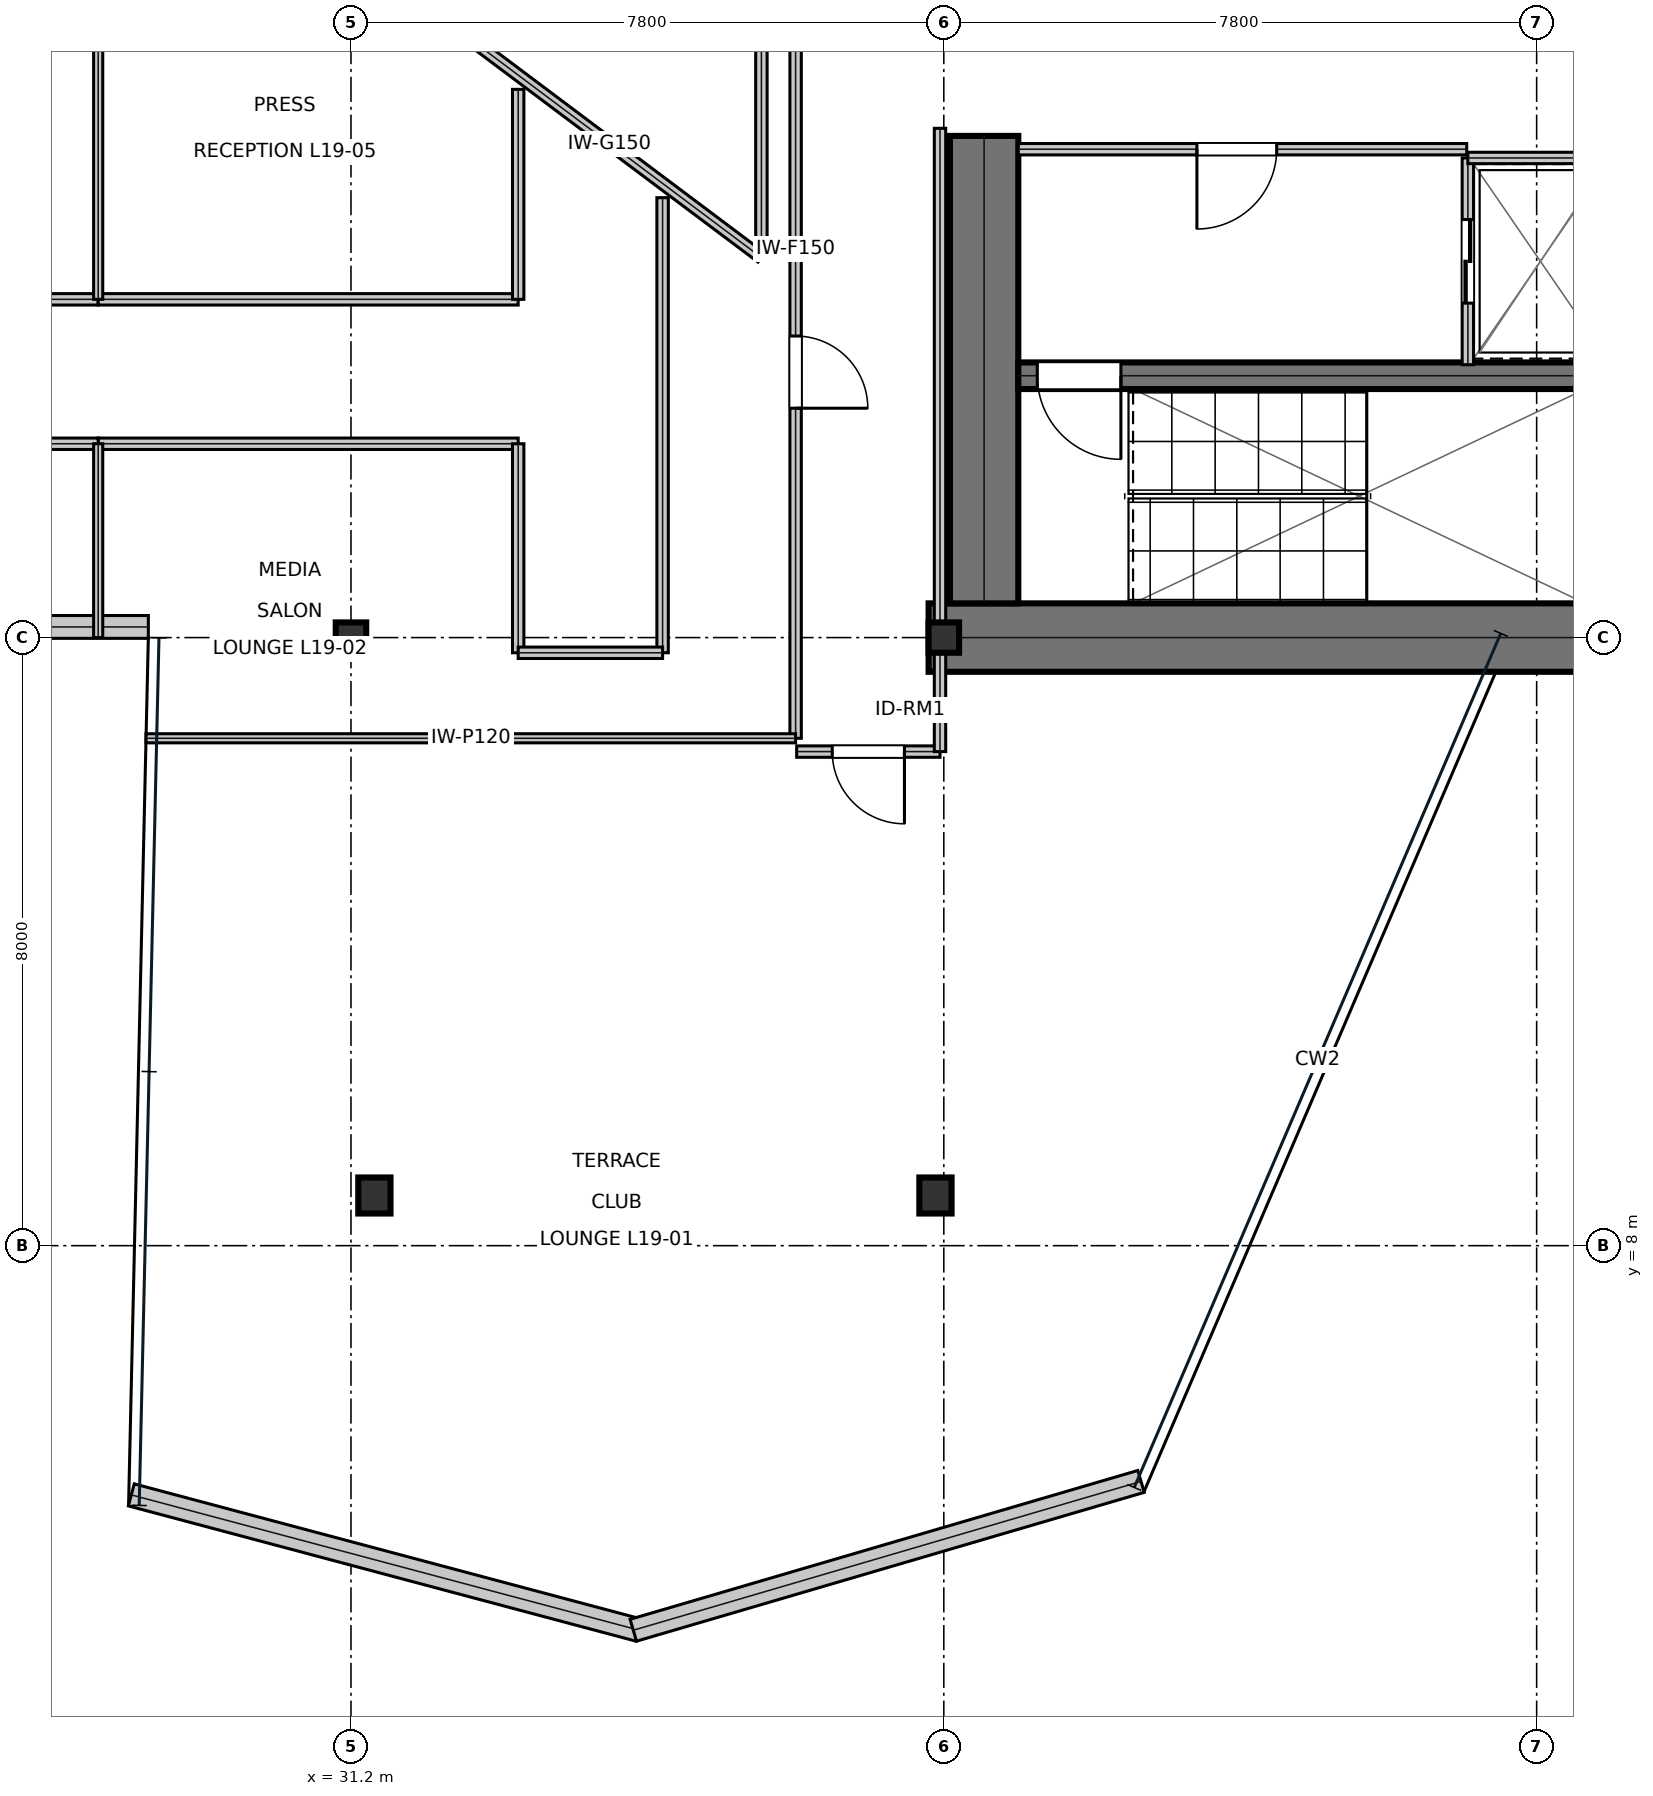
"""IFC4 building model, lengths in metres.
Left out: names, types, materials, properties, quantities, classifications, styles, units other than length and angle.
Written with IfcOpenShell. Run it as: python <this file> out.ifc"""

import sys

from ifc_helpers import new_model, si_unit, direction, frame, frame_2d, origin, origin_2d, place, context, subcontext, project, spatial, rectangle, i_section, extrude, element, fill, save


model = new_model("IFC4")
c1 = context("Model", 3, precision=1e-05, world=origin(), true_north=direction((0.0, 1.0)))
c2 = subcontext(c1, "Body", "Model", "MODEL_VIEW")
j1 = project(units=[si_unit("LENGTHUNIT", "METRE"), si_unit("PLANEANGLEUNIT", "RADIAN")], contexts=[c1])
p1 = place(None, origin())
s1 = spatial("IfcSite", under=j1, at=p1, CompositionType="ELEMENT")
p2 = place(p1, origin())
s2 = spatial("IfcBuilding", under=s1, at=p2, CompositionType="ELEMENT")
p3 = place(p2, frame((0.0, 0.0, 86.4)))
s3 = spatial("IfcBuildingStorey", under=s2, at=p3, CompositionType="ELEMENT", Elevation=86.4)
p4 = place(p3, frame((38.8, 16.0, 0.0), z_axis=(0.0, 0.0, 1.0), x_axis=(1.0, 0.0, 0.0)))
e1 = element("IfcWall", 1, at=p4, inside=s3, PredefinedType="SHEAR", context=c2, shape_type="SweptSolid", body=[
    extrude(rectangle(XDim=16.0, YDim=0.9, at=frame_2d((8.0, 0.0))), origin(), (0.0, 0.0, 1.0), 3.81),
])
p5 = place(p3, frame((39.53, 16.45, 0.0), z_axis=(0.0, 0.0, 1.0), x_axis=(0.0, 1.0, 0.0)))
e2 = element("IfcWall", 2, at=p5, inside=s3, PredefinedType="SHEAR", context=c2, shape_type="SweptSolid", body=[
    extrude(rectangle(XDim=6.15, YDim=0.9, at=frame_2d((3.075, 0.0))), origin(), (0.0, 0.0, 1.0), 3.81),
])
p6 = place(p3, frame((39.98, 19.445, 0.0), z_axis=(0.0, 0.0, 1.0), x_axis=(1.0, 0.0, 0.0)))
e3 = element("IfcWall", 3, at=p6, inside=s3, PredefinedType="SHEAR", context=c2, shape_type="SweptSolid", body=[
    extrude(rectangle(XDim=7.71, YDim=0.35, at=frame_2d((3.855, 0.0))), origin(), (0.0, 0.0, 1.0), 3.81),
])
p7 = place(p6, frame((0.25, 0.0, 0.0)))
e4 = element("IfcOpeningElement", 4, at=p7, cuts=e3, PredefinedType="OPENING", context=c2, shape_type="SweptSolid", body=[
    extrude(rectangle(XDim=1.1, YDim=2.15, at=frame_2d((0.55, 1.075))), frame((0.0, 0.185, 0.0), z_axis=(0.0, -1.0, 0.0), x_axis=(1.0, 0.0, 0.0)), (0.0, 0.0, 1.0), 0.37),
])
for number, where, z_axis, x_axis in (
    (5, (31.2, 16.0, 0.0), (0.0, 0.0, 1.0), (1.0, 0.0, 0.0)),
    (6, (39.0, 16.0, 0.0), (0.0, 0.0, 1.0), (1.0, 0.0, 0.0)),
):
    element("IfcColumn", number, at=place(p3, frame(where, z_axis=z_axis, x_axis=x_axis)), inside=s3, PredefinedType="COLUMN", context=c2, shape_type="SweptSolid", body=[
        extrude(i_section(OverallWidth=0.401, OverallDepth=0.399, WebThickness=0.025, FlangeThickness=0.04, at=origin_2d()), origin(), (0.0, 0.0, 1.0), 4.044),
    ])
p8 = place(p3, frame((31.508, 8.66, 0.016), z_axis=(0.003463243796, 0.00747331556, 0.999966077173), x_axis=(-0.907310606534, 0.420461012784, 0.0)))
e7 = element("IfcColumn", 7, at=p8, inside=s3, PredefinedType="COLUMN", context=c2, shape_type="SweptSolid", body=[
    extrude(i_section(OverallWidth=0.424, OverallDepth=0.474, WebThickness=0.048, FlangeThickness=0.077, at=origin_2d()), origin(), (0.0, 0.0, 1.0), 4.018),
])
p9 = place(p3, frame((38.89, 8.66, 0.016), z_axis=(-0.001215179652, 0.007473354861, 0.999971335742), x_axis=(-0.987036848987, -0.160493796583, 0.0)))
e8 = element("IfcColumn", 8, at=p9, inside=s3, PredefinedType="COLUMN", context=c2, shape_type="SweptSolid", body=[
    extrude(i_section(OverallWidth=0.424, OverallDepth=0.474, WebThickness=0.048, FlangeThickness=0.077, at=origin_2d()), origin(), (0.0, 0.0, 1.0), 4.018),
])
p10 = place(p3, frame((25.752, 16.14, 0.0), z_axis=(0.0, 0.0, 1.0), x_axis=(1.0, 0.0, 0.0)))
e9 = element("IfcWall", 9, at=p10, inside=s3, PredefinedType="STANDARD", context=c2, shape_type="SweptSolid", body=[
    extrude(rectangle(XDim=2.782, YDim=0.3, at=frame_2d((1.391, 0.0))), origin(), (0.0, 0.0, 1.0), 3.81),
])
p11 = place(p3, frame((28.31, 4.721, 0.0), z_axis=(0.0, 0.0, 1.0), x_axis=(0.966292357614, -0.257447236569, 0.0)))
e10 = element("IfcWall", 10, at=p11, inside=s3, PredefinedType="STANDARD", context=c2, shape_type="SweptSolid", body=[
    extrude(rectangle(XDim=6.913, YDim=0.3, at=frame_2d((3.457, 0.0))), origin(), (0.0, 0.0, 1.0), 3.81),
])
p12 = place(p3, frame((34.915, 2.94, 0.0), z_axis=(0.0, 0.0, 1.0), x_axis=(0.959627564603, 0.281273776336, 0.0)))
e11 = element("IfcWall", 11, at=p12, inside=s3, PredefinedType="STANDARD", context=c2, shape_type="SweptSolid", body=[
    extrude(rectangle(XDim=6.961, YDim=0.3, at=frame_2d((3.48, 0.0))), origin(), (0.0, 0.0, 1.0), 3.81),
])
p13 = place(p3, frame((39.98, 22.425, 0.0), z_axis=(0.0, 0.0, 1.0), x_axis=(1.0, 0.0, 0.0)))
e12 = element("IfcWall", 12, at=p13, inside=s3, PredefinedType="PARTITIONING", context=c2, shape_type="SweptSolid", body=[
    extrude(rectangle(XDim=5.9, YDim=0.15, at=frame_2d((2.95, 0.0))), origin(), (0.0, 0.0, 1.0), 3.81),
])
p14 = place(p13, frame((2.35, 0.0, 0.0)))
e13 = element("IfcOpeningElement", 13, at=p14, cuts=e12, PredefinedType="OPENING", context=c2, shape_type="SweptSolid", body=[
    extrude(rectangle(XDim=1.05, YDim=2.15, at=frame_2d((0.525, 1.075))), frame((0.0, 0.085, 0.0), z_axis=(0.0, -1.0, 0.0), x_axis=(1.0, 0.0, 0.0)), (0.0, 0.0, 1.0), 0.17),
])
p15 = place(p3, frame((45.895, 19.59, 0.0), z_axis=(0.0, 0.0, 1.0), x_axis=(0.0, 1.0, 0.0)))
e14 = element("IfcWall", 14, at=p15, inside=s3, PredefinedType="PARTITIONING", context=c2, shape_type="SweptSolid", body=[
    extrude(rectangle(XDim=2.72, YDim=0.15, at=frame_2d((1.36, 0.0))), origin(), (0.0, 0.0, 1.0), 3.81),
])
p16 = place(p15, frame((0.81, 0.0, 0.0)))
e15 = element("IfcOpeningElement", 15, at=p16, cuts=e14, PredefinedType="OPENING", context=c2, shape_type="SweptSolid", body=[
    extrude(rectangle(XDim=1.1, YDim=2.15, at=frame_2d((0.55, 1.075))), frame((0.0, 0.085, 0.0), z_axis=(0.0, -1.0, 0.0), x_axis=(1.0, 0.0, 0.0)), (0.0, 0.0, 1.0), 0.17),
])
p17 = place(p3, frame((45.895, 22.31, 0.0), z_axis=(0.0, 0.0, 1.0), x_axis=(1.0, 0.0, 0.0)))
e16 = element("IfcWall", 16, at=p17, inside=s3, PredefinedType="PARTITIONING", context=c2, shape_type="SweptSolid", body=[
    extrude(rectangle(XDim=1.915, YDim=0.15, at=frame_2d((0.958, 0.0))), origin(), (0.0, 0.0, 1.0), 3.81),
])
p18 = place(p3, frame((37.064, 14.5, 0.0), z_axis=(0.0, 0.0, 1.0), x_axis=(1.0, 0.0, 0.0)))
e17 = element("IfcWall", 17, at=p18, inside=s3, PredefinedType="PARTITIONING", context=c2, shape_type="SweptSolid", body=[
    extrude(rectangle(XDim=1.886, YDim=0.15, at=frame_2d((0.943, 0.0))), origin(), (0.0, 0.0, 1.0), 3.181),
])
p19 = place(p18, frame((0.468, 0.0, 0.0)))
e18 = element("IfcOpeningElement", 18, at=p19, cuts=e17, PredefinedType="OPENING", context=c2, shape_type="SweptSolid", body=[
    extrude(rectangle(XDim=0.95, YDim=2.15, at=frame_2d((0.475, 1.075))), frame((0.0, 0.085, 0.0), z_axis=(0.0, -1.0, 0.0), x_axis=(1.0, 0.0, 0.0)), (0.0, 0.0, 1.0), 0.17),
])
p20 = place(p3, frame((37.05, 14.675, 0.0), z_axis=(0.0, 0.0, 1.0), x_axis=(0.0, 1.0, 0.0)))
e19 = element("IfcWall", 19, at=p20, inside=s3, PredefinedType="PARTITIONING", context=c2, shape_type="SweptSolid", body=[
    extrude(rectangle(XDim=12.875, YDim=0.15, at=frame_2d((6.438, 0.0))), origin(), (0.0, 0.0, 1.0), 3.181),
])
p21 = place(p20, frame((4.343, 0.0, 0.0)))
e20 = element("IfcOpeningElement", 20, at=p21, cuts=e19, PredefinedType="OPENING", context=c2, shape_type="SweptSolid", body=[
    extrude(rectangle(XDim=0.95, YDim=2.15, at=frame_2d((0.475, 1.075))), frame((0.0, 0.085, 0.0), z_axis=(0.0, -1.0, 0.0), x_axis=(1.0, 0.0, 0.0)), (0.0, 0.0, 1.0), 0.17),
])
p22 = place(p3, frame((38.95, 14.5, 0.0), z_axis=(0.0, 0.0, 1.0), x_axis=(0.0, 1.0, 0.0)))
e21 = element("IfcWall", 21, at=p22, inside=s3, PredefinedType="PARTITIONING", context=c2, shape_type="SweptSolid", body=[
    extrude(rectangle(XDim=8.2, YDim=0.15, at=frame_2d((4.1, 0.0))), origin(), (0.0, 0.0, 1.0), 3.181),
])
p23 = place(p3, frame((35.3, 15.8, 0.0), z_axis=(0.0, 0.0, 1.0), x_axis=(0.0, 1.0, 0.0)))
e22 = element("IfcWall", 22, at=p23, inside=s3, PredefinedType="PARTITIONING", context=c2, shape_type="SweptSolid", body=[
    extrude(rectangle(XDim=5.988, YDim=0.15, at=frame_2d((2.994, 0.0))), origin(), (0.0, 0.0, 1.0), 3.181),
])
p24 = place(p3, frame((27.874, 18.55, 0.0), z_axis=(0.0, 0.0, 1.0), x_axis=(1.0, 0.0, 0.0)))
e23 = element("IfcWall", 23, at=p24, inside=s3, PredefinedType="PARTITIONING", context=c2, shape_type="SweptSolid", body=[
    extrude(rectangle(XDim=5.526, YDim=0.15, at=frame_2d((2.763, 0.0))), origin(), (0.0, 0.0, 1.0), 3.181),
])
p25 = place(p3, frame((33.4, 15.8, 0.0), z_axis=(0.0, 0.0, 1.0), x_axis=(0.0, 1.0, 0.0)))
e24 = element("IfcWall", 24, at=p25, inside=s3, PredefinedType="PARTITIONING", context=c2, shape_type="SweptSolid", body=[
    extrude(rectangle(XDim=2.75, YDim=0.15, at=frame_2d((1.375, 0.0))), origin(), (0.0, 0.0, 1.0), 3.181),
])
p26 = place(p3, frame((33.4, 15.8, 0.0), z_axis=(0.0, 0.0, 1.0), x_axis=(1.0, 0.0, 0.0)))
e25 = element("IfcWall", 25, at=p26, inside=s3, PredefinedType="PARTITIONING", context=c2, shape_type="SweptSolid", body=[
    extrude(rectangle(XDim=1.9, YDim=0.15, at=frame_2d((0.95, 0.0))), origin(), (0.0, 0.0, 1.0), 3.181),
])
p27 = place(p3, frame((15.674, 18.55, 0.0), z_axis=(0.0, 0.0, 1.0), x_axis=(1.0, 0.0, 0.0)))
e26 = element("IfcWall", 26, at=p27, inside=s3, PredefinedType="PARTITIONING", context=c2, shape_type="SweptSolid", body=[
    extrude(rectangle(XDim=12.2, YDim=0.15, at=frame_2d((6.1, 0.0))), origin(), (0.0, 0.0, 1.0), 3.338),
])
p28 = place(p3, frame((21.4, 20.45, 0.0), z_axis=(0.0, 0.0, 1.0), x_axis=(1.0, 0.0, 0.0)))
e27 = element("IfcWall", 27, at=p28, inside=s3, PredefinedType="PARTITIONING", context=c2, shape_type="SweptSolid", body=[
    extrude(rectangle(XDim=6.474, YDim=0.15, at=frame_2d((3.237, 0.0))), origin(), (0.0, 0.0, 1.0), 3.391),
])
p29 = place(p3, frame((27.874, 20.45, 0.0), z_axis=(0.0, 0.0, 1.0), x_axis=(1.0, 0.0, 0.0)))
e28 = element("IfcWall", 28, at=p29, inside=s3, PredefinedType="PARTITIONING", context=c2, shape_type="SweptSolid", body=[
    extrude(rectangle(XDim=5.526, YDim=0.15, at=frame_2d((2.763, 0.0))), origin(), (0.0, 0.0, 1.0), 3.181),
])
p30 = place(p3, frame((33.4, 20.45, 0.0), z_axis=(0.0, 0.0, 1.0), x_axis=(0.0, 1.0, 0.0)))
e29 = element("IfcWall", 29, at=p30, inside=s3, PredefinedType="PARTITIONING", context=c2, shape_type="SweptSolid", body=[
    extrude(rectangle(XDim=2.762, YDim=0.15, at=frame_2d((1.381, 0.0))), origin(), (0.0, 0.0, 1.0), 3.81),
])
p31 = place(p3, frame((28.504, 14.675, 0.0), z_axis=(0.0, 0.0, 1.0), x_axis=(1.0, 0.0, 0.0)))
e30 = element("IfcWall", 30, at=p31, inside=s3, PredefinedType="PARTITIONING", context=c2, shape_type="SweptSolid", body=[
    extrude(rectangle(XDim=8.546, YDim=0.12, at=frame_2d((4.273, 0.0))), origin(), (0.0, 0.0, 1.0), 3.338),
])
p32 = place(p3, frame((27.874, 16.0, 0.0), z_axis=(0.0, 0.0, 1.0), x_axis=(0.0, 1.0, 0.0)))
e31 = element("IfcWall", 31, at=p32, inside=s3, PredefinedType="PARTITIONING", context=c2, shape_type="SweptSolid", body=[
    extrude(rectangle(XDim=2.55, YDim=0.12, at=frame_2d((1.275, 0.0))), origin(), (0.0, 0.0, 1.0), 3.338),
])
p33 = place(p3, frame((27.874, 20.45, 0.0), z_axis=(0.0, 0.0, 1.0), x_axis=(0.0, 1.0, 0.0)))
e32 = element("IfcWall", 32, at=p33, inside=s3, PredefinedType="PARTITIONING", context=c2, shape_type="SweptSolid", body=[
    extrude(rectangle(XDim=7.1, YDim=0.12, at=frame_2d((3.55, 0.0))), origin(), (0.0, 0.0, 1.0), 3.181),
])
p34 = place(p3, frame((32.6, 24.0, 0.0), z_axis=(0.0, 0.0, 1.0), x_axis=(0.8, -0.6, 0.0)))
e33 = element("IfcWall", 33, at=p34, inside=s3, PredefinedType="MOVABLE", context=c2, shape_type="SweptSolid", body=[
    extrude(rectangle(XDim=5.0, YDim=0.15, at=frame_2d((2.5, 0.0))), origin(), (0.0, 0.0, 1.0), 3.81),
])
p35 = place(p3, frame((36.6, 21.0, 0.0), z_axis=(0.0, 0.0, 1.0), x_axis=(0.0, 1.0, 0.0)))
e34 = element("IfcWall", 34, at=p35, inside=s3, PredefinedType="MOVABLE", context=c2, shape_type="SweptSolid", body=[
    extrude(rectangle(XDim=6.0, YDim=0.15, at=frame_2d((3.0, 0.0))), origin(), (0.0, 0.0, 1.0), 3.81),
])
p36 = place(p14, frame((1.05, 0.0, 0.0), z_axis=(0.0, 0.0, 1.0), x_axis=(-1.0, 0.0, 0.0)))
e35 = element("IfcDoor", 35, at=p36, inside=s3, OperationType="SINGLE_SWING_RIGHT", PredefinedType="DOOR", context=c2, shape_type="SweptSolid", body=[
    extrude(rectangle(XDim=1.05, YDim=2.15, at=frame_2d((0.525, 1.075))), frame((0.0, 0.025, 0.0), z_axis=(0.0, -1.0, 0.0), x_axis=(1.0, 0.0, 0.0)), (0.0, 0.0, 1.0), 0.05),
])
fill(e13, e35)
p37 = place(p16, frame((1.1, 0.0, 0.0), z_axis=(0.0, 0.0, 1.0), x_axis=(-1.0, 0.0, 0.0)))
e36 = element("IfcDoor", 36, at=p37, inside=s3, OperationType="DOUBLE_DOOR_SLIDING", PredefinedType="DOOR", context=c2, shape_type="SweptSolid", body=[
    extrude(rectangle(XDim=1.1, YDim=2.15, at=frame_2d((0.55, 1.075))), frame((0.0, 0.025, 0.0), z_axis=(0.0, -1.0, 0.0), x_axis=(1.0, 0.0, 0.0)), (0.0, 0.0, 1.0), 0.05),
])
fill(e15, e36)
p38 = place(p19, frame((0.95, 0.0, 0.0), z_axis=(0.0, 0.0, 1.0), x_axis=(-1.0, 0.0, 0.0)))
e37 = element("IfcDoor", 37, at=p38, inside=s3, OperationType="SINGLE_SWING_LEFT", PredefinedType="DOOR", context=c2, shape_type="SweptSolid", body=[
    extrude(rectangle(XDim=0.95, YDim=2.15, at=frame_2d((0.475, 1.075))), frame((0.0, 0.025, 0.0), z_axis=(0.0, -1.0, 0.0), x_axis=(1.0, 0.0, 0.0)), (0.0, 0.0, 1.0), 0.05),
])
fill(e18, e37)
p39 = place(p21, frame((0.95, 0.0, 0.0), z_axis=(0.0, 0.0, 1.0), x_axis=(-1.0, 0.0, 0.0)))
e38 = element("IfcDoor", 38, at=p39, inside=s3, OperationType="SINGLE_SWING_RIGHT", PredefinedType="DOOR", context=c2, shape_type="SweptSolid", body=[
    extrude(rectangle(XDim=0.95, YDim=2.15, at=frame_2d((0.475, 1.075))), frame((0.0, 0.025, 0.0), z_axis=(0.0, -1.0, 0.0), x_axis=(1.0, 0.0, 0.0)), (0.0, 0.0, 1.0), 0.05),
])
fill(e20, e38)
p40 = place(p7, frame((1.1, 0.0, 0.0), z_axis=(0.0, 0.0, 1.0), x_axis=(-1.0, 0.0, 0.0)))
e39 = element("IfcDoor", 39, at=p40, inside=s3, OperationType="SINGLE_SWING_LEFT", PredefinedType="DOOR", context=c2, shape_type="SweptSolid", body=[
    extrude(rectangle(XDim=1.1, YDim=2.15, at=frame_2d((0.55, 1.075))), frame((0.0, 0.025, 0.0), z_axis=(0.0, -1.0, 0.0), x_axis=(1.0, 0.0, 0.0)), (0.0, 0.0, 1.0), 0.05),
])
fill(e4, e39)
save(model, sys.argv[1])
